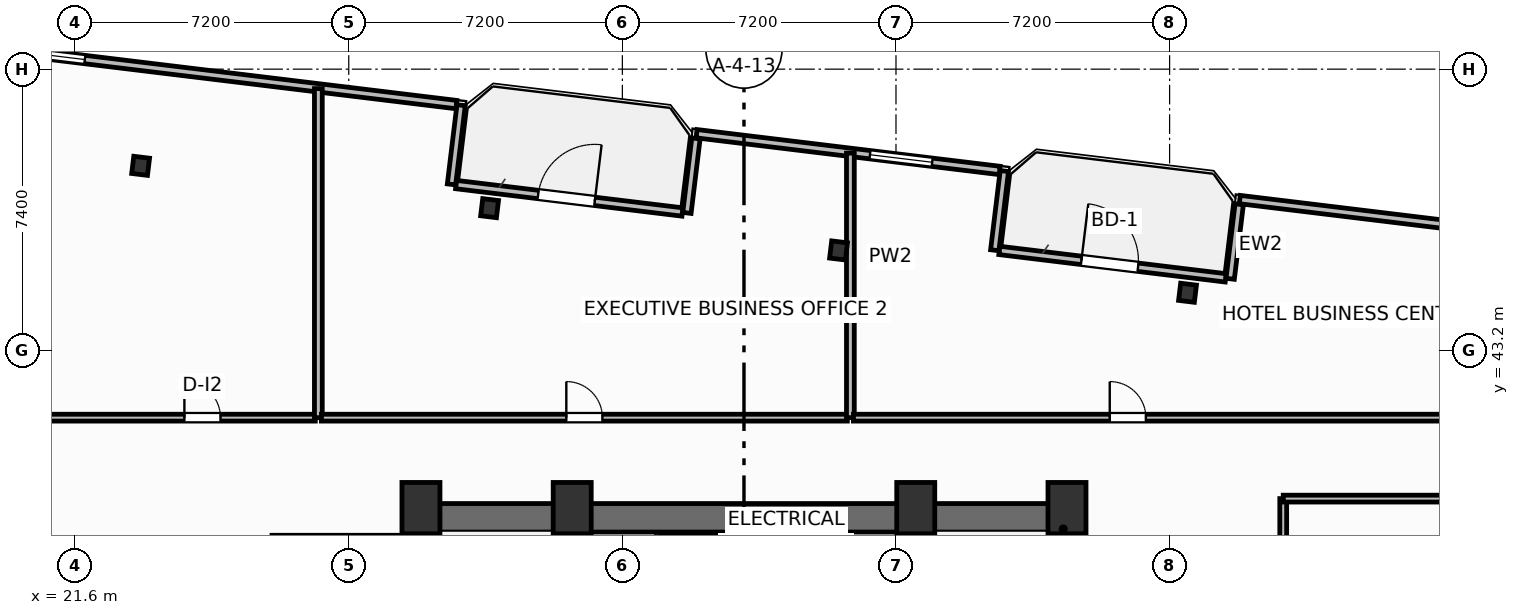
"""IFC4 building model, lengths in metres.
Left out: names, types, materials, properties, quantities, classifications, styles, units other than length and angle.
Written with IfcOpenShell. Run it as: python <this file> out.ifc"""

import sys

from ifc_helpers import new_model, si_unit, direction, frame, frame_2d, origin, origin_2d, place, context, subcontext, project, spatial, rectangle, i_section, extrude, element, fill, save


model = new_model("IFC4")
c1 = context("Model", 3, precision=1e-05, world=origin(), true_north=direction((0.0, 1.0)))
c2 = subcontext(c1, "Body", "Model", "MODEL_VIEW")
j1 = project(units=[si_unit("LENGTHUNIT", "METRE"), si_unit("PLANEANGLEUNIT", "RADIAN")], contexts=[c1])
p1 = place(None, origin())
s1 = spatial("IfcSite", under=j1, at=p1, CompositionType="ELEMENT")
p2 = place(p1, origin())
s2 = spatial("IfcBuilding", under=s1, at=p2, CompositionType="ELEMENT")
p3 = place(p2, frame((0.0, 0.0, 136.5)))
s3 = spatial("IfcBuildingStorey", under=s2, at=p3, CompositionType="ELEMENT", Elevation=136.5)
for number, where, z_axis, x_axis in (
    (1, (30.7, 39.05, 0.0), (0.0, 0.0, 1.0), (1.0, 0.0, 0.0)),
    (2, (34.68, 39.05, 0.0), (0.0, 0.0, 1.0), (1.0, 0.0, 0.0)),
    (3, (43.72, 39.05, 0.0), (0.0, 0.0, 1.0), (1.0, 0.0, 0.0)),
    (4, (47.7, 39.05, 0.0), (0.0, 0.0, 1.0), (1.0, 0.0, 0.0)),
):
    element("IfcColumn", number, at=place(p3, frame(where, z_axis=z_axis, x_axis=x_axis)), inside=s3, PredefinedType="COLUMN", context=c2, shape_type="SweptSolid", body=[
        extrude(rectangle(XDim=1.0, YDim=1.35, at=origin_2d()), origin(), (0.0, 0.0, 1.0), 3.7),
    ])
p4 = place(p3, frame((30.38, 38.795, 0.0), z_axis=(0.0, 0.0, 1.0), x_axis=(1.0, 0.0, 0.0)))
e5 = element("IfcWall", 5, at=p4, inside=s3, PredefinedType="SHEAR", context=c2, shape_type="SweptSolid", body=[
    extrude(rectangle(XDim=17.64, YDim=0.75, at=frame_2d((8.82, 0.0))), origin(), (0.0, 0.0, 1.0), 3.45),
])
for number, where, z_axis, x_axis in (
    (6, (30.755, 29.2, 0.0), (0.0, 0.0, 1.0), (0.0, 1.0, 0.0)),
    (7, (47.645, 29.2, 0.0), (0.0, 0.0, 1.0), (0.0, 1.0, 0.0)),
):
    element("IfcWall", number, at=place(p3, frame(where, z_axis=z_axis, x_axis=x_axis)), inside=s3, PredefinedType="SHEAR", context=c2, shape_type="SweptSolid", body=[
        extrude(rectangle(XDim=9.22, YDim=0.75, at=frame_2d((4.61, 0.0))), origin(), (0.0, 0.0, 1.0), 3.45),
    ])
p5 = place(p3, frame((34.64, 29.2, 0.0), z_axis=(0.0, 0.0, 1.0), x_axis=(0.0, 1.0, 0.0)))
e8 = element("IfcWall", 8, at=p5, inside=s3, PredefinedType="SHEAR", context=c2, shape_type="SweptSolid", body=[
    extrude(rectangle(XDim=9.22, YDim=0.25, at=frame_2d((4.61, 0.0))), origin(), (0.0, 0.0, 1.0), 3.45),
])
p6 = place(p5, frame((0.65, 0.0, 0.0)))
e9 = element("IfcOpeningElement", 9, at=p6, cuts=e8, PredefinedType="OPENING", context=c2, shape_type="SweptSolid", body=[
    extrude(rectangle(XDim=1.05, YDim=2.15, at=frame_2d((0.525, 1.075))), frame((0.0, 0.135, 0.0), z_axis=(0.0, -1.0, 0.0), x_axis=(1.0, 0.0, 0.0)), (0.0, 0.0, 1.0), 0.27),
])
p7 = place(p3, frame((43.76, 29.2, 0.0), z_axis=(0.0, 0.0, 1.0), x_axis=(0.0, 1.0, 0.0)))
e10 = element("IfcWall", 10, at=p7, inside=s3, PredefinedType="SHEAR", context=c2, shape_type="SweptSolid", body=[
    extrude(rectangle(XDim=9.22, YDim=0.25, at=frame_2d((4.61, 0.0))), origin(), (0.0, 0.0, 1.0), 3.45),
])
p8 = place(p7, frame((0.65, 0.0, 0.0)))
e11 = element("IfcOpeningElement", 11, at=p8, cuts=e10, PredefinedType="OPENING", context=c2, shape_type="SweptSolid", body=[
    extrude(rectangle(XDim=1.05, YDim=2.15, at=frame_2d((0.525, 1.075))), frame((0.0, 0.135, 0.0), z_axis=(0.0, -1.0, 0.0), x_axis=(1.0, 0.0, 0.0)), (0.0, 0.0, 1.0), 0.27),
])
for number, where, z_axis, x_axis in (
    (12, (50.872, 44.717, 0.0), (0.0, 0.0, 1.0), (0.993, -0.12, 0.0)),
    (13, (41.689, 45.83, 0.0), (0.0, 0.0, 1.0), (0.993, -0.12, 0.0)),
    (14, (32.506, 46.943, 0.0), (0.0, 0.0, 1.0), (0.993, -0.12, 0.0)),
    (15, (23.323, 48.056, 0.0), (0.0, 0.0, 1.0), (0.993, -0.12, 0.0)),
):
    element("IfcColumn", number, at=place(p3, frame(where, z_axis=z_axis, x_axis=x_axis)), inside=s3, PredefinedType="COLUMN", context=c2, shape_type="SweptSolid", body=[
        extrude(i_section(OverallWidth=0.418, OverallDepth=0.455, WebThickness=0.042, FlangeThickness=0.068, FilletRadius=0.025, at=origin_2d()), origin(), (0.0, 0.0, 1.0), 3.7),
    ])
p9 = place(p3, frame((31.624, 47.563, 0.0), z_axis=(0.0, 0.0, 1.0), x_axis=(0.992729951822, -0.120362962556, 0.0)))
e16 = element("IfcWall", 16, at=p9, inside=s3, PredefinedType="SOLIDWALL", context=c2, shape_type="SweptSolid", body=[
    extrude(rectangle(XDim=6.0, YDim=0.22, at=frame_2d((3.0, 0.0))), origin(), (0.0, 0.0, 1.0), 2.73),
])
p10 = place(p9, frame((2.176, 0.0, 0.0)))
e17 = element("IfcOpeningElement", 17, at=p10, cuts=e16, PredefinedType="OPENING", context=c2, shape_type="SweptSolid", body=[
    extrude(rectangle(XDim=1.5, YDim=2.25, at=frame_2d((0.75, 1.125))), frame((0.0, 0.12, 0.0), z_axis=(0.0, -1.0, 0.0), x_axis=(1.0, 0.0, 0.0)), (0.0, 0.0, 1.0), 0.24),
])
p11 = place(p3, frame((45.92, 45.831, 0.0), z_axis=(0.0, 0.0, 1.0), x_axis=(0.992729951822, -0.120362962556, 0.0)))
e18 = element("IfcWall", 18, at=p11, inside=s3, PredefinedType="SOLIDWALL", context=c2, shape_type="SweptSolid", body=[
    extrude(rectangle(XDim=6.0, YDim=0.22, at=frame_2d((3.0, 0.0))), origin(), (0.0, 0.0, 1.0), 2.73),
])
p12 = place(p11, frame((2.176, 0.0, 0.0)))
e19 = element("IfcOpeningElement", 19, at=p12, cuts=e18, PredefinedType="OPENING", context=c2, shape_type="SweptSolid", body=[
    extrude(rectangle(XDim=1.5, YDim=2.25, at=frame_2d((0.75, 1.125))), frame((0.0, 0.12, 0.0), z_axis=(0.0, -1.0, 0.0), x_axis=(1.0, 0.0, 0.0)), (0.0, 0.0, 1.0), 0.24),
])
p13 = place(p3, frame((73.538, 44.588, 0.0), z_axis=(0.0, 0.0, 1.0), x_axis=(-0.992733493583, 0.120333747213, 0.0)))
e20 = element("IfcWall", 20, at=p13, inside=s3, PredefinedType="SOLIDWALL", context=c2, shape_type="SweptSolid", body=[
    extrude(rectangle(XDim=21.447, YDim=0.22, at=frame_2d((10.724, 0.0))), origin(), (0.0, 0.0, 1.0), 2.73),
])
p14 = place(p13, frame((9.899, 0.0, 0.8)))
e21 = element("IfcOpeningElement", 21, at=p14, cuts=e20, PredefinedType="OPENING", context=c2, shape_type="SweptSolid", body=[
    extrude(rectangle(XDim=1.65, YDim=1.65, at=frame_2d((0.825, 0.825))), frame((0.0, 0.12, 0.0), z_axis=(0.0, -1.0, 0.0), x_axis=(1.0, 0.0, 0.0)), (0.0, 0.0, 1.0), 0.24),
])
p15 = place(p3, frame((52.231, 47.045, 0.0), z_axis=(0.0, 0.0, 1.0), x_axis=(-0.120275992932, -0.992740492538, 0.0)))
e22 = element("IfcWall", 22, at=p15, inside=s3, PredefinedType="SOLIDWALL", context=c2, shape_type="SweptSolid", body=[
    extrude(rectangle(XDim=1.975, YDim=0.22, at=frame_2d((0.988, 0.0))), origin(), (0.0, 0.0, 1.0), 2.73),
])
p16 = place(p3, frame((45.799, 45.835, 0.0), z_axis=(0.0, 0.0, 1.0), x_axis=(0.120314009587, 0.992735885871, 0.0)))
e23 = element("IfcWall", 23, at=p16, inside=s3, PredefinedType="SOLIDWALL", context=c2, shape_type="SweptSolid", body=[
    extrude(rectangle(XDim=2.1, YDim=0.22, at=frame_2d((1.05, 0.0))), origin(), (0.0, 0.0, 1.0), 2.73),
])
p17 = place(p3, frame((45.928, 47.935, 0.0), z_axis=(0.0, 0.0, 1.0), x_axis=(-0.992730591876, 0.120357683402, 0.0)))
e24 = element("IfcWall", 24, at=p17, inside=s3, PredefinedType="SOLIDWALL", context=c2, shape_type="SweptSolid", body=[
    extrude(rectangle(XDim=8.035, YDim=0.22, at=frame_2d((4.017, 0.0))), origin(), (0.0, 0.0, 1.0), 2.73),
])
p18 = place(p17, frame((1.788, 0.0, 0.8)))
e25 = element("IfcOpeningElement", 25, at=p18, cuts=e24, PredefinedType="OPENING", context=c2, shape_type="SweptSolid", body=[
    extrude(rectangle(XDim=1.65, YDim=1.65, at=frame_2d((0.825, 0.825))), frame((0.0, 0.12, 0.0), z_axis=(0.0, -1.0, 0.0), x_axis=(1.0, 0.0, 0.0)), (0.0, 0.0, 1.0), 0.24),
])
p19 = place(p3, frame((37.936, 48.778, 0.0), z_axis=(0.0, 0.0, 1.0), x_axis=(-0.120397815541, -0.992725725472, 0.0)))
e26 = element("IfcWall", 26, at=p19, inside=s3, PredefinedType="SOLIDWALL", context=c2, shape_type="SweptSolid", body=[
    extrude(rectangle(XDim=1.975, YDim=0.22, at=frame_2d((0.988, 0.0))), origin(), (0.0, 0.0, 1.0), 2.73),
])
p20 = place(p3, frame((31.504, 47.568, 0.0), z_axis=(0.0, 0.0, 1.0), x_axis=(0.120341784665, 0.992732519294, 0.0)))
e27 = element("IfcWall", 27, at=p20, inside=s3, PredefinedType="SOLIDWALL", context=c2, shape_type="SweptSolid", body=[
    extrude(rectangle(XDim=2.1, YDim=0.22, at=frame_2d((1.05, 0.0))), origin(), (0.0, 0.0, 1.0), 2.73),
])
p21 = place(p3, frame((31.633, 49.668, 0.0), z_axis=(0.0, 0.0, 1.0), x_axis=(-0.992731670483, 0.120348786531, 0.0)))
e28 = element("IfcWall", 28, at=p21, inside=s3, PredefinedType="SOLIDWALL", context=c2, shape_type="SweptSolid", body=[
    extrude(rectangle(XDim=21.347, YDim=0.22, at=frame_2d((10.674, 0.0))), origin(), (0.0, 0.0, 1.0), 2.73),
])
p22 = place(p21, frame((9.849, 0.0, 0.8)))
e29 = element("IfcOpeningElement", 29, at=p22, cuts=e28, PredefinedType="OPENING", context=c2, shape_type="SweptSolid", body=[
    extrude(rectangle(XDim=1.65, YDim=1.65, at=frame_2d((0.825, 0.825))), frame((0.0, 0.12, 0.0), z_axis=(0.0, -1.0, 0.0), x_axis=(1.0, 0.0, 0.0)), (0.0, 0.0, 1.0), 0.24),
])
p23 = place(p3, frame((3.864, 41.43, 0.0), z_axis=(0.0, 0.0, 1.0), x_axis=(1.0, 0.0, 0.0)))
e30 = element("IfcWall", 30, at=p23, inside=s3, PredefinedType="PARTITIONING", context=c2, shape_type="SweptSolid", body=[
    extrude(rectangle(XDim=24.056, YDim=0.18, at=frame_2d((12.028, 0.0))), origin(), (0.0, 0.0, 1.0), 3.45),
])
p24 = place(p23, frame((20.611, 0.0, 0.0)))
e31 = element("IfcOpeningElement", 31, at=p24, cuts=e30, PredefinedType="OPENING", context=c2, shape_type="SweptSolid", body=[
    extrude(rectangle(XDim=0.95, YDim=2.05, at=frame_2d((0.475, 1.025))), frame((0.0, 0.1, 0.0), z_axis=(0.0, -1.0, 0.0), x_axis=(1.0, 0.0, 0.0)), (0.0, 0.0, 1.0), 0.2),
])
p25 = place(p3, frame((28.0, 41.43, 0.0), z_axis=(0.0, 0.0, 1.0), x_axis=(0.0, 1.0, 0.0)))
e32 = element("IfcWall", 32, at=p25, inside=s3, PredefinedType="PARTITIONING", context=c2, shape_type="SweptSolid", body=[
    extrude(rectangle(XDim=8.658, YDim=0.205, at=frame_2d((4.329, 0.0))), origin(), (0.0, 0.0, 1.0), 3.45),
])
p26 = place(p3, frame((28.08, 41.43, 0.0), z_axis=(0.0, 0.0, 1.0), x_axis=(1.0, 0.0, 0.0)))
e33 = element("IfcWall", 33, at=p26, inside=s3, PredefinedType="PARTITIONING", context=c2, shape_type="SweptSolid", body=[
    extrude(rectangle(XDim=13.84, YDim=0.18, at=frame_2d((6.92, 0.0))), origin(), (0.0, 0.0, 1.0), 3.45),
])
p27 = place(p26, frame((6.445, 0.0, 0.0)))
e34 = element("IfcOpeningElement", 34, at=p27, cuts=e33, PredefinedType="OPENING", context=c2, shape_type="SweptSolid", body=[
    extrude(rectangle(XDim=0.95, YDim=2.05, at=frame_2d((0.475, 1.025))), frame((0.0, 0.1, 0.0), z_axis=(0.0, -1.0, 0.0), x_axis=(1.0, 0.0, 0.0)), (0.0, 0.0, 1.0), 0.2),
])
p28 = place(p3, frame((42.0, 41.43, 0.0), z_axis=(0.0, 0.0, 1.0), x_axis=(0.0, 1.0, 0.0)))
e35 = element("IfcWall", 35, at=p28, inside=s3, PredefinedType="PARTITIONING", context=c2, shape_type="SweptSolid", body=[
    extrude(rectangle(XDim=6.961, YDim=0.205, at=frame_2d((3.48, 0.0))), origin(), (0.0, 0.0, 1.0), 2.662),
])
p29 = place(p3, frame((42.08, 41.43, 0.0), z_axis=(0.0, 0.0, 1.0), x_axis=(1.0, 0.0, 0.0)))
e36 = element("IfcWall", 36, at=p29, inside=s3, PredefinedType="PARTITIONING", context=c2, shape_type="SweptSolid", body=[
    extrude(rectangle(XDim=32.24, YDim=0.18, at=frame_2d((16.12, 0.0))), origin(), (0.0, 0.0, 1.0), 3.45),
])
p30 = place(p29, frame((6.745, 0.0, 0.0)))
e37 = element("IfcOpeningElement", 37, at=p30, cuts=e36, PredefinedType="OPENING", context=c2, shape_type="SweptSolid", body=[
    extrude(rectangle(XDim=0.95, YDim=2.05, at=frame_2d((0.475, 1.025))), frame((0.0, 0.1, 0.0), z_axis=(0.0, -1.0, 0.0), x_axis=(1.0, 0.0, 0.0)), (0.0, 0.0, 1.0), 0.2),
])
p31 = place(p3, frame((53.39, 19.24, 0.0), z_axis=(0.0, 0.0, 1.0), x_axis=(0.0, 1.0, 0.0)))
e38 = element("IfcWall", 38, at=p31, inside=s3, PredefinedType="PARTITIONING", context=c2, shape_type="SweptSolid", body=[
    extrude(rectangle(XDim=20.06, YDim=0.18, at=frame_2d((10.03, 0.0))), origin(), (0.0, 0.0, 1.0), 3.45),
])
p32 = place(p31, frame((7.7, 0.0, 0.0)))
e39 = element("IfcOpeningElement", 39, at=p32, cuts=e38, PredefinedType="OPENING", context=c2, shape_type="SweptSolid", body=[
    extrude(rectangle(XDim=0.95, YDim=2.05, at=frame_2d((0.475, 1.025))), frame((0.0, 0.1, 0.0), z_axis=(0.0, -1.0, 0.0), x_axis=(1.0, 0.0, 0.0)), (0.0, 0.0, 1.0), 0.2),
])
p33 = place(p3, frame((53.39, 39.3, 0.0), z_axis=(0.0, 0.0, 1.0), x_axis=(1.0, 0.0, 0.0)))
e40 = element("IfcWall", 40, at=p33, inside=s3, PredefinedType="PARTITIONING", context=c2, shape_type="SweptSolid", body=[
    extrude(rectangle(XDim=24.74, YDim=0.18, at=frame_2d((12.37, 0.0))), origin(), (0.0, 0.0, 1.0), 3.45),
])
p34 = place(p10, origin())
e41 = element("IfcDoor", 41, at=p34, inside=s3, OperationType="SINGLE_SWING_RIGHT", PredefinedType="DOOR", context=c2, shape_type="SweptSolid", body=[
    extrude(rectangle(XDim=1.5, YDim=2.25, at=frame_2d((0.75, 1.125))), frame((0.0, 0.025, 0.0), z_axis=(0.0, -1.0, 0.0), x_axis=(1.0, 0.0, 0.0)), (0.0, 0.0, 1.0), 0.05),
])
fill(e17, e41)
p35 = place(p12, origin())
e42 = element("IfcDoor", 42, at=p35, inside=s3, OperationType="SINGLE_SWING_LEFT", PredefinedType="DOOR", context=c2, shape_type="SweptSolid", body=[
    extrude(rectangle(XDim=1.5, YDim=2.25, at=frame_2d((0.75, 1.125))), frame((0.0, 0.025, 0.0), z_axis=(0.0, -1.0, 0.0), x_axis=(1.0, 0.0, 0.0)), (0.0, 0.0, 1.0), 0.05),
])
fill(e19, e42)
p36 = place(p18, origin())
e43 = element("IfcWindow", 43, at=p36, inside=s3, PartitioningType="SINGLE_PANEL", PredefinedType="WINDOW", context=c2, shape_type="SweptSolid", body=[
    extrude(rectangle(XDim=1.65, YDim=1.65, at=frame_2d((0.825, 0.825))), frame((0.0, 0.03, 0.0), z_axis=(0.0, -1.0, 0.0), x_axis=(1.0, 0.0, 0.0)), (0.0, 0.0, 1.0), 0.06),
])
fill(e25, e43)
p37 = place(p22, origin())
e44 = element("IfcWindow", 44, at=p37, inside=s3, PartitioningType="SINGLE_PANEL", PredefinedType="WINDOW", context=c2, shape_type="SweptSolid", body=[
    extrude(rectangle(XDim=1.65, YDim=1.65, at=frame_2d((0.825, 0.825))), frame((0.0, 0.03, 0.0), z_axis=(0.0, -1.0, 0.0), x_axis=(1.0, 0.0, 0.0)), (0.0, 0.0, 1.0), 0.06),
])
fill(e29, e44)
p38 = place(p24, origin())
e45 = element("IfcDoor", 45, at=p38, inside=s3, OperationType="SINGLE_SWING_LEFT", PredefinedType="DOOR", context=c2, shape_type="SweptSolid", body=[
    extrude(rectangle(XDim=0.95, YDim=2.05, at=frame_2d((0.475, 1.025))), frame((0.0, 0.025, 0.0), z_axis=(0.0, -1.0, 0.0), x_axis=(1.0, 0.0, 0.0)), (0.0, 0.0, 1.0), 0.05),
])
fill(e31, e45)
p39 = place(p27, origin())
e46 = element("IfcDoor", 46, at=p39, inside=s3, OperationType="SINGLE_SWING_LEFT", PredefinedType="DOOR", context=c2, shape_type="SweptSolid", body=[
    extrude(rectangle(XDim=0.95, YDim=2.05, at=frame_2d((0.475, 1.025))), frame((0.0, 0.025, 0.0), z_axis=(0.0, -1.0, 0.0), x_axis=(1.0, 0.0, 0.0)), (0.0, 0.0, 1.0), 0.05),
])
fill(e34, e46)
p40 = place(p30, origin())
e47 = element("IfcDoor", 47, at=p40, inside=s3, OperationType="SINGLE_SWING_LEFT", PredefinedType="DOOR", context=c2, shape_type="SweptSolid", body=[
    extrude(rectangle(XDim=0.95, YDim=2.05, at=frame_2d((0.475, 1.025))), frame((0.0, 0.025, 0.0), z_axis=(0.0, -1.0, 0.0), x_axis=(1.0, 0.0, 0.0)), (0.0, 0.0, 1.0), 0.05),
])
fill(e37, e47)
save(model, sys.argv[1])
